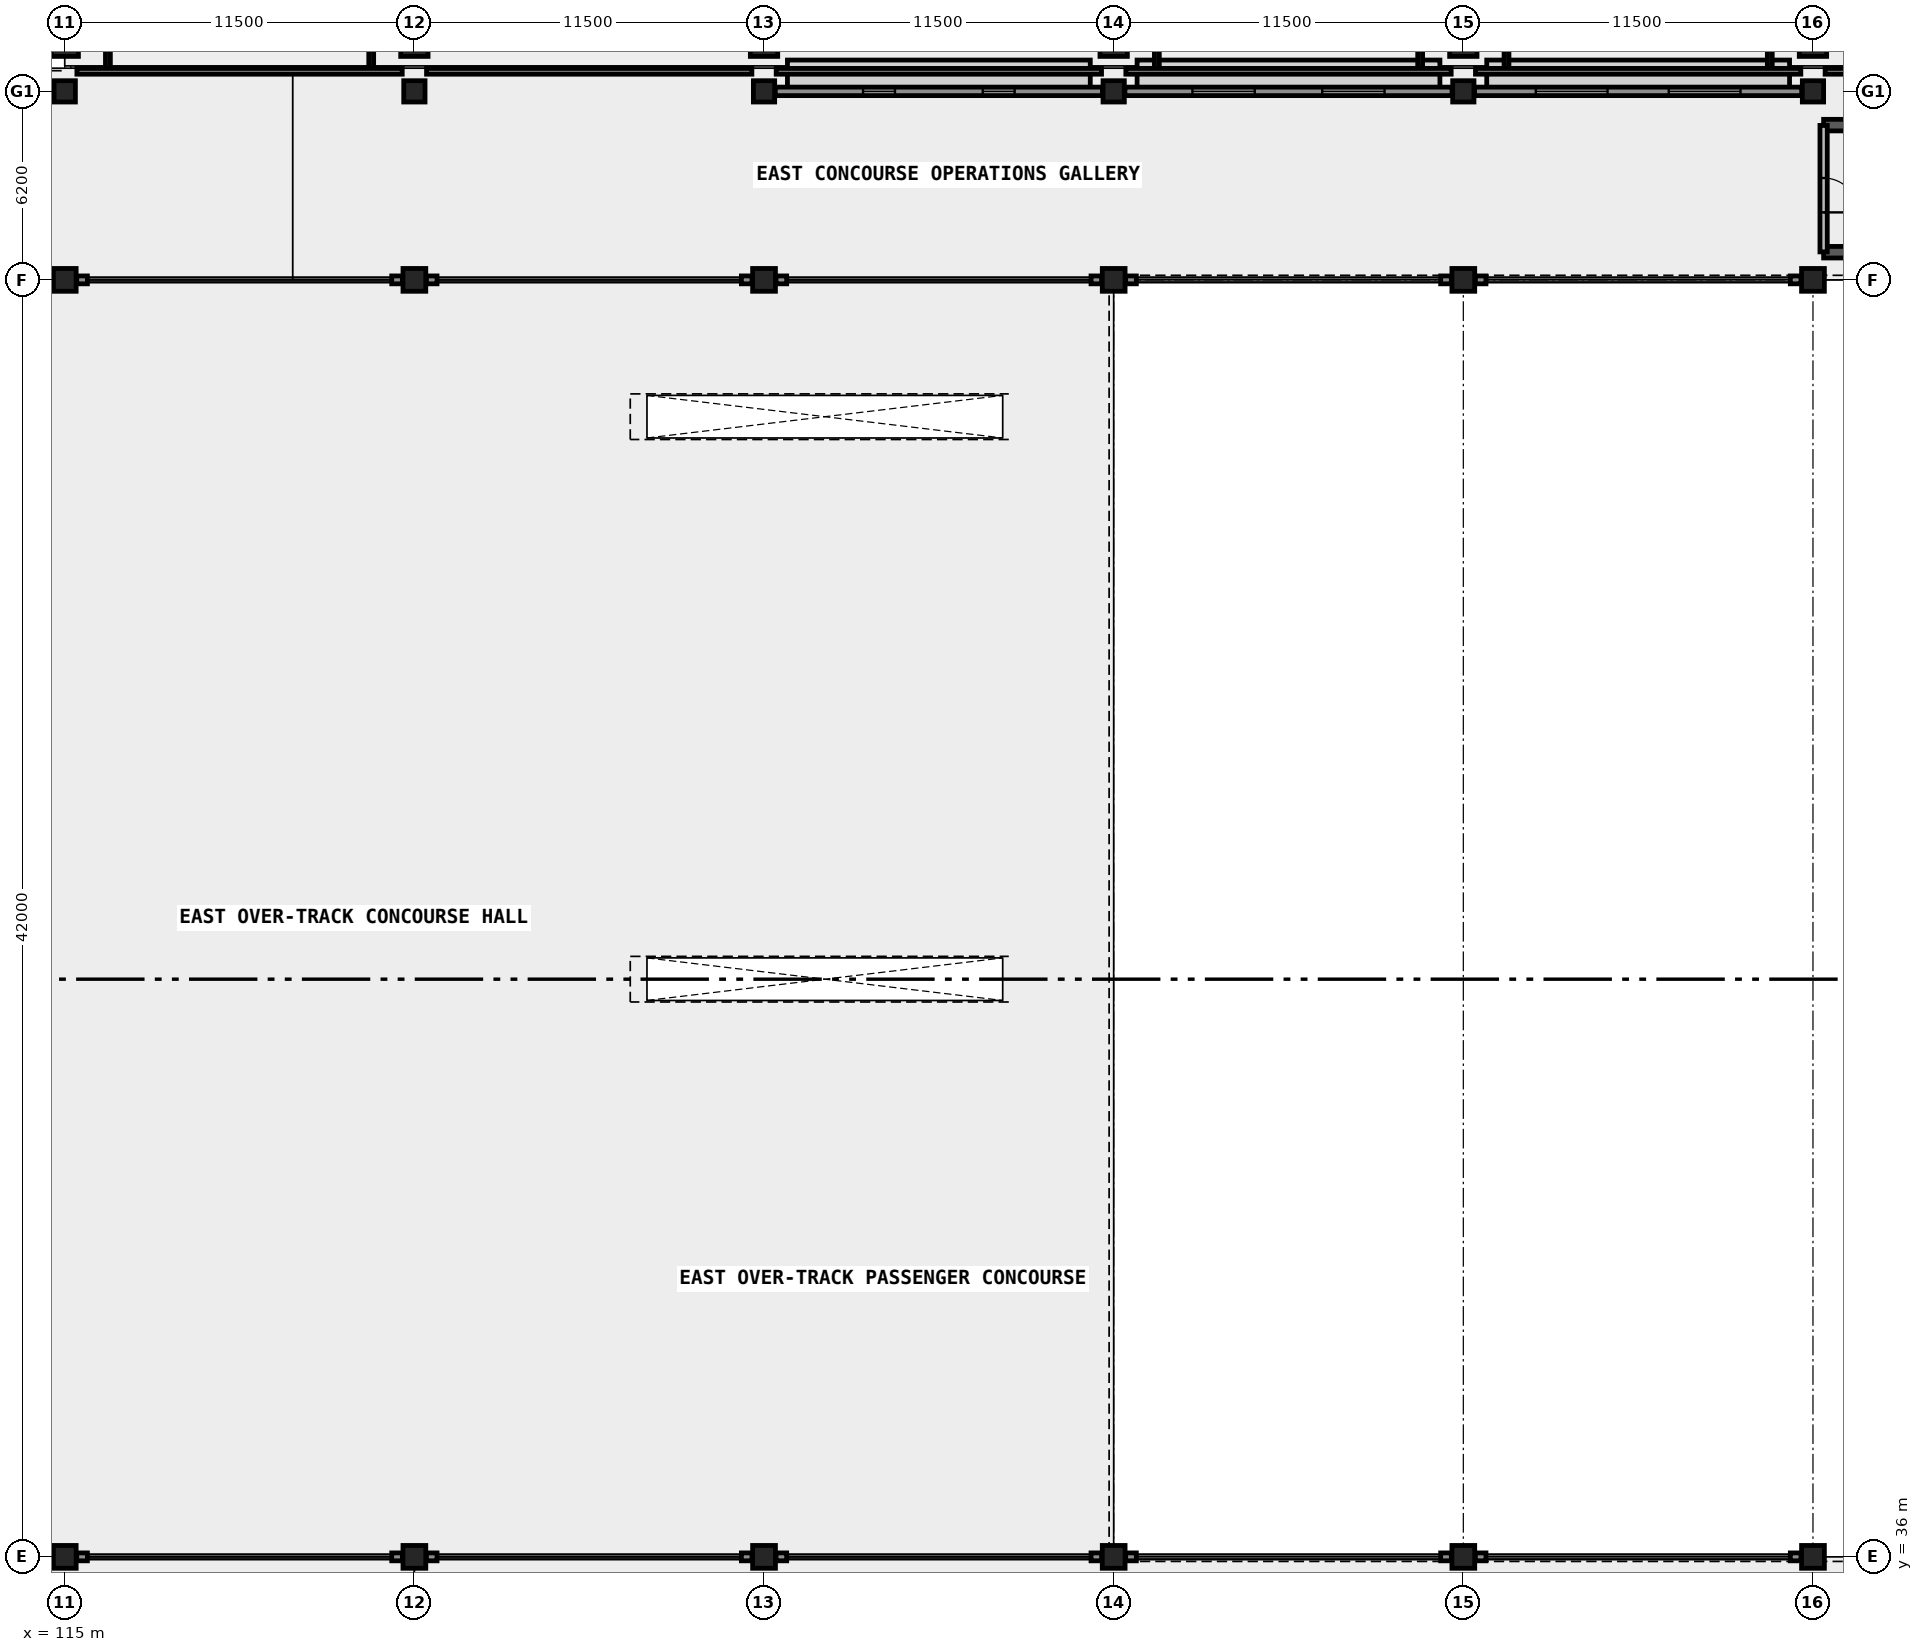
"""IFC4 building model, lengths in metres.
Left out: names, types, materials, properties, quantities, classifications, styles, units other than length and angle.
Written with IfcOpenShell. Run it as: python <this file> out.ifc"""

import sys

from ifc_helpers import new_model, si_unit, direction, frame, frame_2d, origin, origin_2d, place, context, subcontext, project, spatial, rectangle, extrude, element, fill, save


model = new_model("IFC4")
c1 = context("Model", 3, precision=1e-05, world=origin(), true_north=direction((0.0, 1.0)))
c2 = subcontext(c1, "Body", "Model", "MODEL_VIEW")
j1 = project(units=[si_unit("LENGTHUNIT", "METRE"), si_unit("PLANEANGLEUNIT", "RADIAN")], contexts=[c1])
p1 = place(None, origin())
s1 = spatial("IfcSite", under=j1, at=p1, CompositionType="ELEMENT")
p2 = place(p1, origin())
s2 = spatial("IfcBuilding", under=s1, at=p2, CompositionType="ELEMENT")
p3 = place(p2, frame((0.0, 0.0, 8.4)))
s3 = spatial("IfcBuildingStorey", under=s2, at=p3, CompositionType="ELEMENT", Elevation=8.4)
for number, where, z_axis, x_axis in (
    (1, (115.0, 36.0, 0.0), (0.0, 0.0, 1.0), (1.0, 0.0, 0.0)),
    (2, (115.0, 78.0, 0.0), (0.0, 0.0, 1.0), (1.0, 0.0, 0.0)),
):
    element("IfcColumn", number, at=place(p3, frame(where, z_axis=z_axis, x_axis=x_axis)), inside=s3, PredefinedType="COLUMN", context=c2, shape_type="SweptSolid", body=[
        extrude(rectangle(XDim=0.75, YDim=0.75, at=origin_2d()), origin(), (0.0, 0.0, 1.0), 5.4),
    ])
p4 = place(p3, frame((115.0, 84.2, 0.0), z_axis=(0.0, 0.0, 1.0), x_axis=(1.0, 0.0, 0.0)))
e3 = element("IfcColumn", 3, at=p4, inside=s3, PredefinedType="COLUMN", context=c2, shape_type="SweptSolid", body=[
    extrude(rectangle(XDim=0.7, YDim=0.7, at=origin_2d()), origin(), (0.0, 0.0, 1.0), 5.4),
])
p5 = place(p3, frame((115.0, 85.8, 0.0), z_axis=(0.0, 0.0, 1.0), x_axis=(1.0, 0.0, 0.0)))
e4 = element("IfcColumn", 4, at=p5, inside=s3, PredefinedType="COLUMN", context=c2, shape_type="SweptSolid", body=[
    extrude(rectangle(XDim=0.9, YDim=0.9, at=origin_2d()), origin(), (0.0, 0.0, 1.0), 5.4),
])
for number, where, z_axis, x_axis in (
    (5, (126.5, 36.0, 0.0), (0.0, 0.0, 1.0), (1.0, 0.0, 0.0)),
    (6, (126.5, 78.0, 0.0), (0.0, 0.0, 1.0), (1.0, 0.0, 0.0)),
):
    element("IfcColumn", number, at=place(p3, frame(where, z_axis=z_axis, x_axis=x_axis)), inside=s3, PredefinedType="COLUMN", context=c2, shape_type="SweptSolid", body=[
        extrude(rectangle(XDim=0.75, YDim=0.75, at=origin_2d()), origin(), (0.0, 0.0, 1.0), 5.4),
    ])
p6 = place(p3, frame((126.5, 84.2, 0.0), z_axis=(0.0, 0.0, 1.0), x_axis=(1.0, 0.0, 0.0)))
e7 = element("IfcColumn", 7, at=p6, inside=s3, PredefinedType="COLUMN", context=c2, shape_type="SweptSolid", body=[
    extrude(rectangle(XDim=0.7, YDim=0.7, at=origin_2d()), origin(), (0.0, 0.0, 1.0), 5.4),
])
p7 = place(p3, frame((126.5, 85.8, 0.0), z_axis=(0.0, 0.0, 1.0), x_axis=(1.0, 0.0, 0.0)))
e8 = element("IfcColumn", 8, at=p7, inside=s3, PredefinedType="COLUMN", context=c2, shape_type="SweptSolid", body=[
    extrude(rectangle(XDim=0.9, YDim=0.9, at=origin_2d()), origin(), (0.0, 0.0, 1.0), 5.4),
])
for number, where, z_axis, x_axis in (
    (9, (138.0, 36.0, 0.0), (0.0, 0.0, 1.0), (1.0, 0.0, 0.0)),
    (10, (138.0, 78.0, 0.0), (0.0, 0.0, 1.0), (1.0, 0.0, 0.0)),
):
    element("IfcColumn", number, at=place(p3, frame(where, z_axis=z_axis, x_axis=x_axis)), inside=s3, PredefinedType="COLUMN", context=c2, shape_type="SweptSolid", body=[
        extrude(rectangle(XDim=0.75, YDim=0.75, at=origin_2d()), origin(), (0.0, 0.0, 1.0), 5.4),
    ])
p8 = place(p3, frame((138.0, 84.2, 0.0), z_axis=(0.0, 0.0, 1.0), x_axis=(1.0, 0.0, 0.0)))
e11 = element("IfcColumn", 11, at=p8, inside=s3, PredefinedType="COLUMN", context=c2, shape_type="SweptSolid", body=[
    extrude(rectangle(XDim=0.7, YDim=0.7, at=origin_2d()), origin(), (0.0, 0.0, 1.0), 5.4),
])
p9 = place(p3, frame((138.0, 85.8, 0.0), z_axis=(0.0, 0.0, 1.0), x_axis=(1.0, 0.0, 0.0)))
e12 = element("IfcColumn", 12, at=p9, inside=s3, PredefinedType="COLUMN", context=c2, shape_type="SweptSolid", body=[
    extrude(rectangle(XDim=0.9, YDim=0.9, at=origin_2d()), origin(), (0.0, 0.0, 1.0), 5.4),
])
for number, where, z_axis, x_axis in (
    (13, (149.5, 36.0, 0.0), (0.0, 0.0, 1.0), (1.0, 0.0, 0.0)),
    (14, (149.5, 78.0, 0.0), (0.0, 0.0, 1.0), (1.0, 0.0, 0.0)),
):
    element("IfcColumn", number, at=place(p3, frame(where, z_axis=z_axis, x_axis=x_axis)), inside=s3, PredefinedType="COLUMN", context=c2, shape_type="SweptSolid", body=[
        extrude(rectangle(XDim=0.75, YDim=0.75, at=origin_2d()), origin(), (0.0, 0.0, 1.0), 5.4),
    ])
p10 = place(p3, frame((149.5, 84.2, 0.0), z_axis=(0.0, 0.0, 1.0), x_axis=(1.0, 0.0, 0.0)))
e15 = element("IfcColumn", 15, at=p10, inside=s3, PredefinedType="COLUMN", context=c2, shape_type="SweptSolid", body=[
    extrude(rectangle(XDim=0.7, YDim=0.7, at=origin_2d()), origin(), (0.0, 0.0, 1.0), 5.4),
])
p11 = place(p3, frame((149.5, 85.8, 0.0), z_axis=(0.0, 0.0, 1.0), x_axis=(1.0, 0.0, 0.0)))
e16 = element("IfcColumn", 16, at=p11, inside=s3, PredefinedType="COLUMN", context=c2, shape_type="SweptSolid", body=[
    extrude(rectangle(XDim=0.9, YDim=0.9, at=origin_2d()), origin(), (0.0, 0.0, 1.0), 5.4),
])
for number, where, z_axis, x_axis in (
    (17, (161.0, 36.0, 0.0), (0.0, 0.0, 1.0), (1.0, 0.0, 0.0)),
    (18, (161.0, 78.0, 0.0), (0.0, 0.0, 1.0), (1.0, 0.0, 0.0)),
):
    element("IfcColumn", number, at=place(p3, frame(where, z_axis=z_axis, x_axis=x_axis)), inside=s3, PredefinedType="COLUMN", context=c2, shape_type="SweptSolid", body=[
        extrude(rectangle(XDim=0.75, YDim=0.75, at=origin_2d()), origin(), (0.0, 0.0, 1.0), 5.4),
    ])
p12 = place(p3, frame((161.0, 84.2, 0.0), z_axis=(0.0, 0.0, 1.0), x_axis=(1.0, 0.0, 0.0)))
e19 = element("IfcColumn", 19, at=p12, inside=s3, PredefinedType="COLUMN", context=c2, shape_type="SweptSolid", body=[
    extrude(rectangle(XDim=0.7, YDim=0.7, at=origin_2d()), origin(), (0.0, 0.0, 1.0), 5.4),
])
p13 = place(p3, frame((161.0, 85.8, 0.0), z_axis=(0.0, 0.0, 1.0), x_axis=(1.0, 0.0, 0.0)))
e20 = element("IfcColumn", 20, at=p13, inside=s3, PredefinedType="COLUMN", context=c2, shape_type="SweptSolid", body=[
    extrude(rectangle(XDim=0.9, YDim=0.9, at=origin_2d()), origin(), (0.0, 0.0, 1.0), 5.4),
])
for number, where, z_axis, x_axis in (
    (21, (172.5, 36.0, 0.0), (0.0, 0.0, 1.0), (1.0, 0.0, 0.0)),
    (22, (172.5, 78.0, 0.0), (0.0, 0.0, 1.0), (1.0, 0.0, 0.0)),
):
    element("IfcColumn", number, at=place(p3, frame(where, z_axis=z_axis, x_axis=x_axis)), inside=s3, PredefinedType="COLUMN", context=c2, shape_type="SweptSolid", body=[
        extrude(rectangle(XDim=0.75, YDim=0.75, at=origin_2d()), origin(), (0.0, 0.0, 1.0), 5.4),
    ])
p14 = place(p3, frame((172.5, 84.2, 0.0), z_axis=(0.0, 0.0, 1.0), x_axis=(1.0, 0.0, 0.0)))
e23 = element("IfcColumn", 23, at=p14, inside=s3, PredefinedType="COLUMN", context=c2, shape_type="SweptSolid", body=[
    extrude(rectangle(XDim=0.7, YDim=0.7, at=origin_2d()), origin(), (0.0, 0.0, 1.0), 5.4),
])
p15 = place(p3, frame((172.5, 85.8, 0.0), z_axis=(0.0, 0.0, 1.0), x_axis=(1.0, 0.0, 0.0)))
e24 = element("IfcColumn", 24, at=p15, inside=s3, PredefinedType="COLUMN", context=c2, shape_type="SweptSolid", body=[
    extrude(rectangle(XDim=0.9, YDim=0.9, at=origin_2d()), origin(), (0.0, 0.0, 1.0), 5.4),
])
for number, where, z_axis, x_axis in (
    (25, (172.85, 78.91, 0.0), (0.0, 0.0, 1.0), (1.0, 0.0, 0.0)),
    (26, (172.85, 83.09, 0.0), (0.0, 0.0, 1.0), (1.0, 0.0, 0.0)),
):
    element("IfcWall", number, at=place(p3, frame(where, z_axis=z_axis, x_axis=x_axis)), inside=s3, PredefinedType="SHEAR", context=c2, shape_type="SweptSolid", body=[
        extrude(rectangle(XDim=8.8, YDim=0.38, at=frame_2d((4.4, 0.0))), origin(), (0.0, 0.0, 1.0), 5.4),
    ])
for number, where, z_axis, x_axis in (
    (27, (114.255, 36.0, 0.0), (0.0, 0.0, 1.0), (1.0, 0.0, 0.0)),
    (28, (114.255, 78.0, 0.0), (0.0, 0.0, 1.0), (1.0, 0.0, 0.0)),
    (29, (115.395, 36.0, 0.0), (0.0, 0.0, 1.0), (1.0, 0.0, 0.0)),
    (30, (125.755, 36.0, 0.0), (0.0, 0.0, 1.0), (1.0, 0.0, 0.0)),
    (31, (115.395, 78.0, 0.0), (0.0, 0.0, 1.0), (1.0, 0.0, 0.0)),
    (32, (125.755, 78.0, 0.0), (0.0, 0.0, 1.0), (1.0, 0.0, 0.0)),
    (33, (126.895, 36.0, 0.0), (0.0, 0.0, 1.0), (1.0, 0.0, 0.0)),
    (34, (137.255, 36.0, 0.0), (0.0, 0.0, 1.0), (1.0, 0.0, 0.0)),
    (35, (126.895, 78.0, 0.0), (0.0, 0.0, 1.0), (1.0, 0.0, 0.0)),
    (36, (137.255, 78.0, 0.0), (0.0, 0.0, 1.0), (1.0, 0.0, 0.0)),
    (37, (138.395, 36.0, 0.0), (0.0, 0.0, 1.0), (1.0, 0.0, 0.0)),
    (38, (148.755, 36.0, 0.0), (0.0, 0.0, 1.0), (1.0, 0.0, 0.0)),
    (39, (138.395, 78.0, 0.0), (0.0, 0.0, 1.0), (1.0, 0.0, 0.0)),
    (40, (148.755, 78.0, 0.0), (0.0, 0.0, 1.0), (1.0, 0.0, 0.0)),
    (41, (149.895, 36.0, 0.0), (0.0, 0.0, 1.0), (1.0, 0.0, 0.0)),
    (42, (160.255, 36.0, 0.0), (0.0, 0.0, 1.0), (1.0, 0.0, 0.0)),
    (43, (149.895, 78.0, 0.0), (0.0, 0.0, 1.0), (1.0, 0.0, 0.0)),
    (44, (160.255, 78.0, 0.0), (0.0, 0.0, 1.0), (1.0, 0.0, 0.0)),
    (45, (161.395, 36.0, 0.0), (0.0, 0.0, 1.0), (1.0, 0.0, 0.0)),
    (46, (171.755, 36.0, 0.0), (0.0, 0.0, 1.0), (1.0, 0.0, 0.0)),
    (47, (161.395, 78.0, 0.0), (0.0, 0.0, 1.0), (1.0, 0.0, 0.0)),
    (48, (171.755, 78.0, 0.0), (0.0, 0.0, 1.0), (1.0, 0.0, 0.0)),
):
    element("IfcWall", number, at=place(p3, frame(where, z_axis=z_axis, x_axis=x_axis)), inside=s3, PredefinedType="SOLIDWALL", context=c2, shape_type="SweptSolid", body=[
        extrude(rectangle(XDim=0.35, YDim=0.26, at=frame_2d((0.175, 0.0))), origin(), (0.0, 0.0, 1.0), 5.1),
    ])
p16 = place(p3, frame((114.28, 84.2, 0.0), z_axis=(0.0, 0.0, 1.0), x_axis=(1.0, 0.0, 0.0)))
e49 = element("IfcWall", 49, at=p16, inside=s3, PredefinedType="SOLIDWALL", context=c2, shape_type="SweptSolid", body=[
    extrude(rectangle(XDim=0.35, YDim=0.26, at=frame_2d((0.175, 0.0))), origin(), (0.0, 0.0, 1.0), 5.1),
])
for number, where, z_axis, x_axis in (
    (50, (115.4, 84.86, 0.0), (0.0, 0.0, 1.0), (1.0, 0.0, 0.0)),
    (51, (126.9, 84.86, 0.0), (0.0, 0.0, 1.0), (1.0, 0.0, 0.0)),
    (52, (138.4, 84.86, 0.0), (0.0, 0.0, 1.0), (1.0, 0.0, 0.0)),
    (53, (149.9, 84.86, 0.0), (0.0, 0.0, 1.0), (1.0, 0.0, 0.0)),
    (54, (161.4, 84.86, 0.0), (0.0, 0.0, 1.0), (1.0, 0.0, 0.0)),
    (55, (172.9, 84.86, 0.0), (0.0, 0.0, 1.0), (1.0, 0.0, 0.0)),
):
    element("IfcWall", number, at=place(p3, frame(where, z_axis=z_axis, x_axis=x_axis)), inside=s3, PredefinedType="PARAPET", context=c2, shape_type="SweptSolid", body=[
        extrude(rectangle(XDim=10.7, YDim=0.19, at=frame_2d((5.35, 0.0))), origin(), (0.0, 0.0, 1.0), 1.15),
    ])
p17 = place(p3, frame((161.37, 84.2, 0.0), z_axis=(0.0, 0.0, 1.0), x_axis=(1.0, 0.0, 0.0)))
e56 = element("IfcWall", 56, at=p17, inside=s3, PredefinedType="SOLIDWALL", context=c2, shape_type="SweptSolid", body=[
    extrude(rectangle(XDim=10.76, YDim=0.28, at=frame_2d((5.38, 0.0))), origin(), (0.0, 0.0, 1.0), 4.25),
])
p18 = place(p17, frame((2.013, 0.0, 0.85)))
e57 = element("IfcOpeningElement", 57, at=p18, cuts=e56, PredefinedType="OPENING", context=c2, shape_type="SweptSolid", body=[
    extrude(rectangle(XDim=2.36, YDim=2.18, at=frame_2d((1.18, 1.09))), frame((0.0, 0.15, 0.0), z_axis=(0.0, -1.0, 0.0), x_axis=(1.0, 0.0, 0.0)), (0.0, 0.0, 1.0), 0.3),
])
p19 = place(p17, frame((6.387, 0.0, 0.85)))
e58 = element("IfcOpeningElement", 58, at=p19, cuts=e56, PredefinedType="OPENING", context=c2, shape_type="SweptSolid", body=[
    extrude(rectangle(XDim=2.36, YDim=2.18, at=frame_2d((1.18, 1.09))), frame((0.0, 0.15, 0.0), z_axis=(0.0, -1.0, 0.0), x_axis=(1.0, 0.0, 0.0)), (0.0, 0.0, 1.0), 0.3),
])
p20 = place(p3, frame((138.37, 84.2, 0.0), z_axis=(0.0, 0.0, 1.0), x_axis=(1.0, 0.0, 0.0)))
e59 = element("IfcWall", 59, at=p20, inside=s3, PredefinedType="SOLIDWALL", context=c2, shape_type="SweptSolid", body=[
    extrude(rectangle(XDim=10.76, YDim=0.28, at=frame_2d((5.38, 0.0))), origin(), (0.0, 0.0, 1.0), 4.25),
])
p21 = place(p20, frame((2.887, 0.0, 0.85)))
e60 = element("IfcOpeningElement", 60, at=p21, cuts=e59, PredefinedType="OPENING", context=c2, shape_type="SweptSolid", body=[
    extrude(rectangle(XDim=1.05, YDim=2.05, at=frame_2d((0.525, 1.025))), frame((0.0, 0.15, 0.0), z_axis=(0.0, -1.0, 0.0), x_axis=(1.0, 0.0, 0.0)), (0.0, 0.0, 1.0), 0.3),
])
p22 = place(p20, frame((6.823, 0.0, 0.85)))
e61 = element("IfcOpeningElement", 61, at=p22, cuts=e59, PredefinedType="OPENING", context=c2, shape_type="SweptSolid", body=[
    extrude(rectangle(XDim=1.05, YDim=2.05, at=frame_2d((0.525, 1.025))), frame((0.0, 0.15, 0.0), z_axis=(0.0, -1.0, 0.0), x_axis=(1.0, 0.0, 0.0)), (0.0, 0.0, 1.0), 0.3),
])
p23 = place(p3, frame((149.87, 84.2, 0.0), z_axis=(0.0, 0.0, 1.0), x_axis=(1.0, 0.0, 0.0)))
e62 = element("IfcWall", 62, at=p23, inside=s3, PredefinedType="SOLIDWALL", context=c2, shape_type="SweptSolid", body=[
    extrude(rectangle(XDim=10.76, YDim=0.28, at=frame_2d((5.38, 0.0))), origin(), (0.0, 0.0, 1.0), 4.25),
])
p24 = place(p23, frame((2.22, 0.0, 0.85)))
e63 = element("IfcOpeningElement", 63, at=p24, cuts=e62, PredefinedType="OPENING", context=c2, shape_type="SweptSolid", body=[
    extrude(rectangle(XDim=2.05, YDim=1.9, at=frame_2d((1.025, 0.95))), frame((0.0, 0.15, 0.0), z_axis=(0.0, -1.0, 0.0), x_axis=(1.0, 0.0, 0.0)), (0.0, 0.0, 1.0), 0.3),
])
p25 = place(p23, frame((6.49, 0.0, 0.85)))
e64 = element("IfcOpeningElement", 64, at=p25, cuts=e62, PredefinedType="OPENING", context=c2, shape_type="SweptSolid", body=[
    extrude(rectangle(XDim=2.05, YDim=1.9, at=frame_2d((1.025, 0.95))), frame((0.0, 0.15, 0.0), z_axis=(0.0, -1.0, 0.0), x_axis=(1.0, 0.0, 0.0)), (0.0, 0.0, 1.0), 0.3),
])
p26 = place(p3, frame((172.85, 78.92, 0.0), z_axis=(0.0, 0.0, 1.0), x_axis=(0.0, 1.0, 0.0)))
e65 = element("IfcWall", 65, at=p26, inside=s3, PredefinedType="SOLIDWALL", context=c2, shape_type="SweptSolid", body=[
    extrude(rectangle(XDim=4.16, YDim=0.24, at=frame_2d((2.08, 0.0))), origin(), (0.0, 0.0, 1.0), 5.12),
])
p27 = place(p26, frame((1.3, 0.0, 0.0)))
e66 = element("IfcOpeningElement", 66, at=p27, cuts=e65, PredefinedType="OPENING", context=c2, shape_type="SweptSolid", body=[
    extrude(rectangle(XDim=1.13, YDim=2.15, at=frame_2d((0.565, 1.075))), frame((0.0, 0.13, 0.0), z_axis=(0.0, -1.0, 0.0), x_axis=(1.0, 0.0, 0.0)), (0.0, 0.0, 1.0), 0.26),
])
p28 = place(p18, origin())
e67 = element("IfcWindow", 67, at=p28, inside=s3, PartitioningType="SINGLE_PANEL", PredefinedType="WINDOW", context=c2, shape_type="SweptSolid", body=[
    extrude(rectangle(XDim=2.36, YDim=2.18, at=frame_2d((1.18, 1.09))), frame((0.0, 0.03, 0.0), z_axis=(0.0, -1.0, 0.0), x_axis=(1.0, 0.0, 0.0)), (0.0, 0.0, 1.0), 0.06),
])
fill(e57, e67)
p29 = place(p19, origin())
e68 = element("IfcWindow", 68, at=p29, inside=s3, PartitioningType="SINGLE_PANEL", PredefinedType="WINDOW", context=c2, shape_type="SweptSolid", body=[
    extrude(rectangle(XDim=2.36, YDim=2.18, at=frame_2d((1.18, 1.09))), frame((0.0, 0.03, 0.0), z_axis=(0.0, -1.0, 0.0), x_axis=(1.0, 0.0, 0.0)), (0.0, 0.0, 1.0), 0.06),
])
fill(e58, e68)
p30 = place(p21, origin())
e69 = element("IfcWindow", 69, at=p30, inside=s3, PartitioningType="SINGLE_PANEL", PredefinedType="WINDOW", context=c2, shape_type="SweptSolid", body=[
    extrude(rectangle(XDim=1.05, YDim=2.05, at=frame_2d((0.525, 1.025))), frame((0.0, 0.03, 0.0), z_axis=(0.0, -1.0, 0.0), x_axis=(1.0, 0.0, 0.0)), (0.0, 0.0, 1.0), 0.06),
])
fill(e60, e69)
p31 = place(p22, origin())
e70 = element("IfcWindow", 70, at=p31, inside=s3, PartitioningType="SINGLE_PANEL", PredefinedType="WINDOW", context=c2, shape_type="SweptSolid", body=[
    extrude(rectangle(XDim=1.05, YDim=2.05, at=frame_2d((0.525, 1.025))), frame((0.0, 0.03, 0.0), z_axis=(0.0, -1.0, 0.0), x_axis=(1.0, 0.0, 0.0)), (0.0, 0.0, 1.0), 0.06),
])
fill(e61, e70)
p32 = place(p24, origin())
e71 = element("IfcWindow", 71, at=p32, inside=s3, PartitioningType="SINGLE_PANEL", PredefinedType="WINDOW", context=c2, shape_type="SweptSolid", body=[
    extrude(rectangle(XDim=2.05, YDim=1.9, at=frame_2d((1.025, 0.95))), frame((0.0, 0.03, 0.0), z_axis=(0.0, -1.0, 0.0), x_axis=(1.0, 0.0, 0.0)), (0.0, 0.0, 1.0), 0.06),
])
fill(e63, e71)
p33 = place(p25, origin())
e72 = element("IfcWindow", 72, at=p33, inside=s3, PartitioningType="SINGLE_PANEL", PredefinedType="WINDOW", context=c2, shape_type="SweptSolid", body=[
    extrude(rectangle(XDim=2.05, YDim=1.9, at=frame_2d((1.025, 0.95))), frame((0.0, 0.03, 0.0), z_axis=(0.0, -1.0, 0.0), x_axis=(1.0, 0.0, 0.0)), (0.0, 0.0, 1.0), 0.06),
])
fill(e64, e72)
p34 = place(p27, frame((0.565, 0.0, 0.0), z_axis=(0.0, 0.0, 1.0), x_axis=(-1.0, 0.0, 0.0)))
e73 = element("IfcDoor", 73, at=p34, inside=s3, OperationType="SINGLE_SWING_LEFT", PredefinedType="DOOR", context=c2, shape_type="SweptSolid", body=[
    extrude(rectangle(XDim=1.13, YDim=2.15, at=frame_2d((0.0, 1.075))), frame((0.0, 0.025, 0.0), z_axis=(0.0, -1.0, 0.0), x_axis=(1.0, 0.0, 0.0)), (0.0, 0.0, 1.0), 0.05),
])
fill(e66, e73)
save(model, sys.argv[1])
